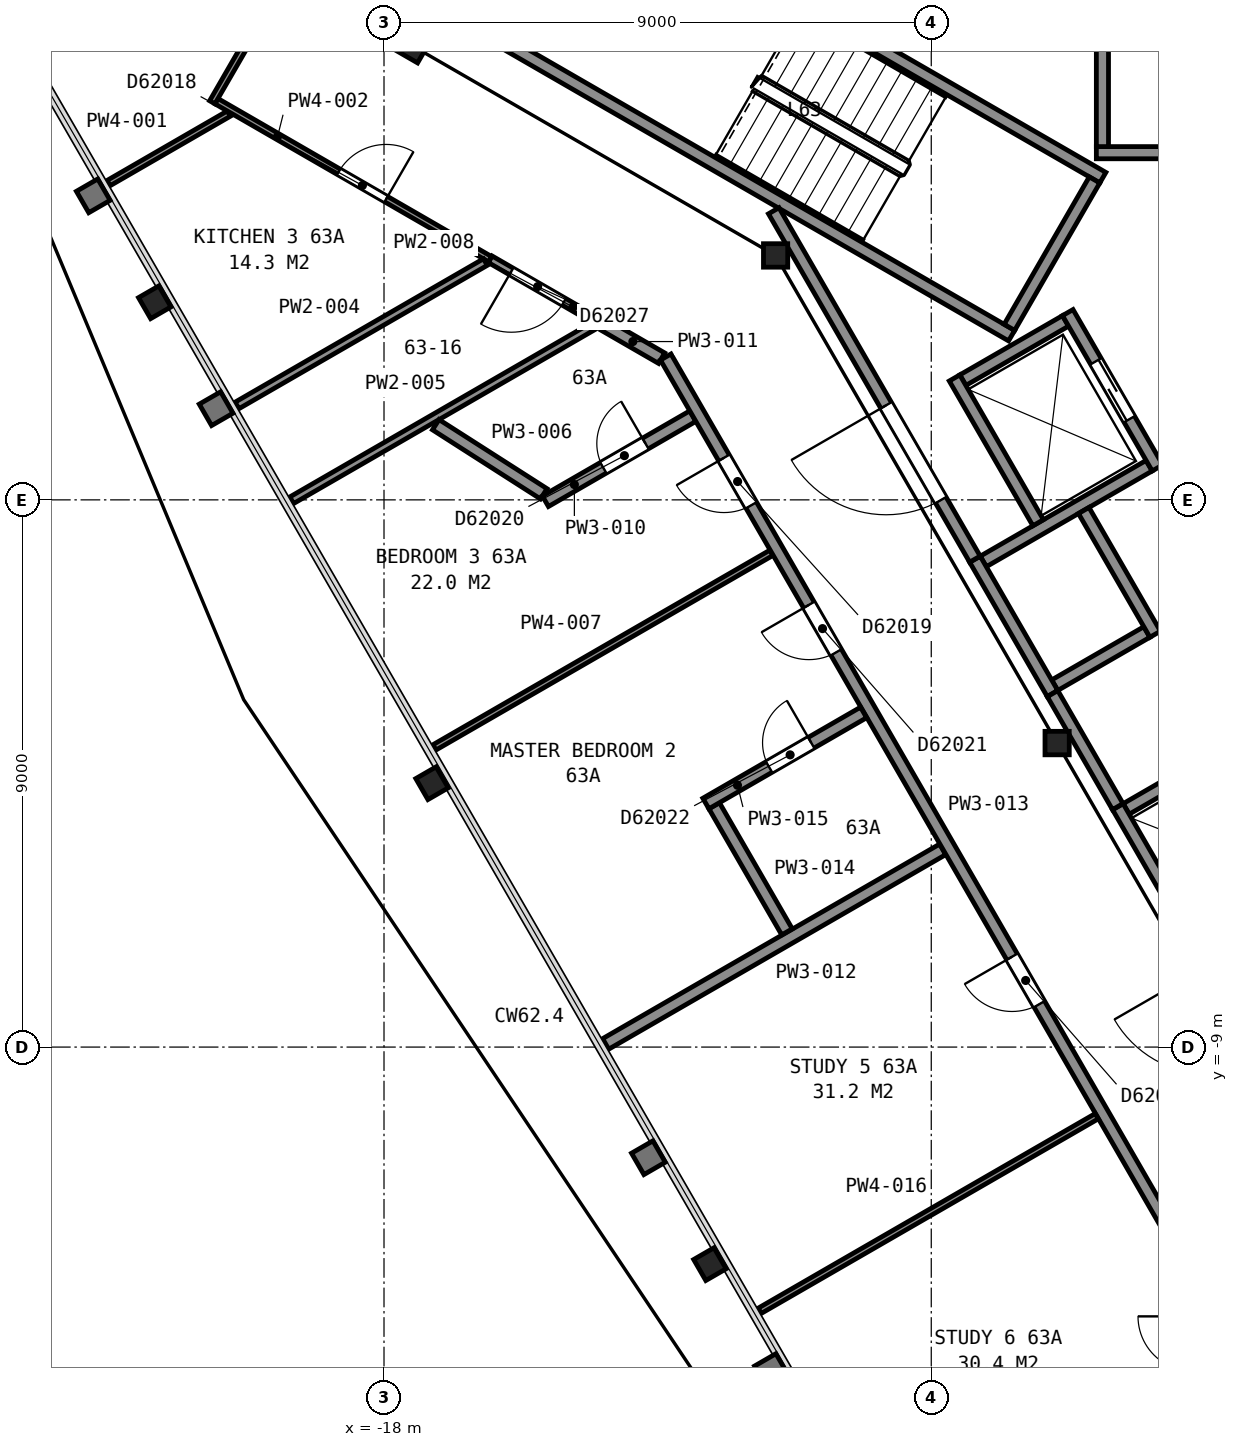
"""IFC4 building model, lengths in metres.
Left out: names, types, materials, properties, quantities, classifications, styles, units other than length and angle.
Written with IfcOpenShell. Run it as: python <this file> out.ifc"""

import sys

from ifc_helpers import new_model, si_unit, direction, frame, frame_2d, origin, origin_2d, place, context, subcontext, project, spatial, rectangle, i_section, extrude, element, fill, save


model = new_model("IFC4")
c1 = context("Model", 3, precision=1e-05, world=origin(), true_north=direction((0.0, 1.0)))
c2 = subcontext(c1, "Body", "Model", "MODEL_VIEW")
j1 = project(units=[si_unit("LENGTHUNIT", "METRE"), si_unit("PLANEANGLEUNIT", "RADIAN")], contexts=[c1])
p1 = place(None, origin())
s1 = spatial("IfcSite", under=j1, at=p1, CompositionType="ELEMENT")
p2 = place(p1, origin())
s2 = spatial("IfcBuilding", under=s1, at=p2, CompositionType="ELEMENT")
p3 = place(p2, frame((0.0, 0.0, 250.8)))
s3 = spatial("IfcBuildingStorey", under=s2, at=p3, CompositionType="ELEMENT", Elevation=250.8)
for number, where, z_axis, x_axis in (
    (1, (-21.77, 3.25, 0.0), (0.0, 0.0, 1.0), (-0.5, 0.866, 0.0)),
    (2, (-17.21, -4.66, 0.0), (0.0, 0.0, 1.0), (-0.5, 0.866, 0.0)),
    (3, (-12.64, -12.57, 0.0), (0.0, 0.0, 1.0), (-0.5, 0.866, 0.0)),
):
    element("IfcColumn", number, at=place(p3, frame(where, z_axis=z_axis, x_axis=x_axis)), inside=s3, PredefinedType="COLUMN", context=c2, shape_type="SweptSolid", body=[
        extrude(i_section(OverallWidth=0.399, OverallDepth=0.386, WebThickness=0.021, FlangeThickness=0.033, FilletRadius=0.015, at=origin_2d()), origin(), (0.0, 0.0, 1.0), 3.7),
    ])
p4 = place(p3, frame((-17.52, 7.46, 0.0), z_axis=(0.0, 0.0, 1.0), x_axis=(0.5, 0.866025403784, 0.0)))
e4 = element("IfcColumn", 4, at=p4, inside=s3, PredefinedType="COLUMN", context=c2, shape_type="SweptSolid", body=[
    extrude(i_section(OverallWidth=0.401, OverallDepth=0.399, WebThickness=0.025, FlangeThickness=0.04, FilletRadius=0.015, at=origin_2d()), origin(), (0.0, 0.0, 1.0), 3.7),
])
for number, where, z_axis, x_axis in (
    (5, (-11.56, 4.02, 0.0), (0.0, 0.0, 1.0), (1.0, 0.0, 0.0)),
    (6, (-6.93, -4.0, 0.0), (0.0, 0.0, 1.0), (1.0, 0.0, 0.0)),
):
    element("IfcColumn", number, at=place(p3, frame(where, z_axis=z_axis, x_axis=x_axis)), inside=s3, PredefinedType="COLUMN", context=c2, shape_type="SweptSolid", body=[
        extrude(i_section(OverallWidth=0.399, OverallDepth=0.386, WebThickness=0.021, FlangeThickness=0.033, FilletRadius=0.015, at=origin_2d()), origin(), (0.0, 0.0, 1.0), 3.7),
    ])
for number, where, z_axis, x_axis in (
    (7, (-7.678, 2.701, 0.0), (0.0, 0.0, 1.0), (-0.866, 0.5, 0.0)),
    (8, (-6.178, 5.299, 0.0), (0.0, 0.0, 1.0), (-0.866, 0.5, 0.0)),
):
    element("IfcWall", number, at=place(p3, frame(where, z_axis=z_axis, x_axis=x_axis)), inside=s3, PredefinedType="PARTITIONING", context=c2, shape_type="SweptSolid", body=[
        extrude(rectangle(XDim=9.6, YDim=0.2, at=frame_2d((4.8, 0.0))), origin(), (0.0, 0.0, 1.0), 3.45),
    ])
p5 = place(p3, frame((-6.315, 5.262, 0.0), z_axis=(0.0, 0.0, 1.0), x_axis=(-0.500049511043, -0.865996816683, 0.0)))
e9 = element("IfcWall", 9, at=p5, inside=s3, PredefinedType="PARTITIONING", context=c2, shape_type="SweptSolid", body=[
    extrude(rectangle(XDim=2.8, YDim=0.2, at=frame_2d((1.4, 0.0))), origin(), (0.0, 0.0, 1.0), 3.45),
])
p6 = place(p3, frame((-6.285, 5.71, 0.0), z_axis=(0.0, 0.0, 1.0), x_axis=(1.0, 0.0, 0.0)))
e10 = element("IfcWall", 10, at=p6, inside=s3, PredefinedType="PARTITIONING", context=c2, shape_type="SweptSolid", body=[
    extrude(rectangle(XDim=2.35, YDim=0.2, at=frame_2d((1.175, 0.0))), origin(), (0.0, 0.0, 1.0), 3.7),
])
for number, where, z_axis, x_axis in (
    (11, (-5.795, -5.083, 0.0), (0.0, 0.0, 1.0), (0.866, 0.5, 0.0)),
    (12, (-6.97, -3.048, 0.0), (0.0, 0.0, 1.0), (0.866, 0.5, 0.0)),
):
    element("IfcWall", number, at=place(p3, frame(where, z_axis=z_axis, x_axis=x_axis)), inside=s3, PredefinedType="PARTITIONING", context=c2, shape_type="SweptSolid", body=[
        extrude(rectangle(XDim=1.75, YDim=0.2, at=frame_2d((0.875, 0.0))), origin(), (0.0, 0.0, 1.0), 3.7),
    ])
p7 = place(p3, frame((-8.145, -1.013, 0.0), z_axis=(0.0, 0.0, 1.0), x_axis=(0.866016494683, 0.500015430699, 0.0)))
e13 = element("IfcWall", 13, at=p7, inside=s3, PredefinedType="PARTITIONING", context=c2, shape_type="SweptSolid", body=[
    extrude(rectangle(XDim=3.15, YDim=0.2, at=frame_2d((1.575, 0.0))), origin(), (0.0, 0.0, 1.0), 3.7),
])
p8 = place(p3, frame((-8.48, 1.969, 0.0), z_axis=(0.0, 0.0, 1.0), x_axis=(0.866000020948, 0.500043961785, 0.0)))
e14 = element("IfcWall", 14, at=p8, inside=s3, PredefinedType="PARTITIONING", context=c2, shape_type="SweptSolid", body=[
    extrude(rectangle(XDim=1.95, YDim=0.2, at=frame_2d((0.975, 0.0))), origin(), (0.0, 0.0, 1.0), 3.7),
])
p9 = place(p3, frame((-6.185, 5.81, 0.0), z_axis=(0.0, 0.0, 1.0), x_axis=(0.0, 1.0, 0.0)))
e15 = element("IfcWall", 15, at=p9, inside=s3, PredefinedType="PARTITIONING", context=c2, shape_type="SweptSolid", body=[
    extrude(rectangle(XDim=1.75, YDim=0.2, at=frame_2d((0.875, 0.0))), origin(), (0.0, 0.0, 1.0), 3.7),
])
p10 = place(p3, frame((-5.28, 0.525, 0.0), z_axis=(0.0, 0.0, 1.0), x_axis=(-0.500037662692, 0.866003658127, 0.0)))
e16 = element("IfcWall", 16, at=p10, inside=s3, PredefinedType="PARTITIONING", context=c2, shape_type="SweptSolid", body=[
    extrude(rectangle(XDim=2.95, YDim=0.2, at=frame_2d((1.475, 0.0))), origin(), (0.0, 0.0, 1.0), 3.7),
])
p11 = place(p10, frame((0.925, 0.0, 0.0)))
e17 = element("IfcOpeningElement", 17, at=p11, cuts=e16, PredefinedType="OPENING", context=c2, shape_type="SweptSolid", body=[
    extrude(rectangle(XDim=1.1, YDim=2.1, at=frame_2d((0.55, 1.05))), frame((0.0, 0.11, 0.0), z_axis=(0.0, -1.0, 0.0), x_axis=(1.0, 0.0, 0.0)), (0.0, 0.0, 1.0), 0.22),
])
p12 = place(p3, frame((-5.318, -2.21, 0.0), z_axis=(0.0, 0.0, 1.0), x_axis=(-0.499938297808, 0.866061024631, 0.0)))
e18 = element("IfcWall", 18, at=p12, inside=s3, PredefinedType="PARTITIONING", context=c2, shape_type="SweptSolid", body=[
    extrude(rectangle(XDim=2.35, YDim=0.2, at=frame_2d((1.175, 0.0))), origin(), (0.0, 0.0, 1.0), 3.7),
])
p13 = place(p3, frame((-7.242, -0.376, 0.0), z_axis=(0.0, 0.0, 1.0), x_axis=(-0.499996545922, 0.866027397988, 0.0)))
e19 = element("IfcWall", 19, at=p13, inside=s3, PredefinedType="PARTITIONING", context=c2, shape_type="SweptSolid", body=[
    extrude(rectangle(XDim=2.75, YDim=0.2, at=frame_2d((1.375, 0.0))), origin(), (0.0, 0.0, 1.0), 3.7),
])
for number, where, z_axis, x_axis in (
    (20, (-4.656, -7.255, 0.0), (0.0, 0.0, 1.0), (-0.5, 0.866, 0.0)),
    (21, (-7.006, -3.185, 0.0), (0.0, 0.0, 1.0), (-0.5, 0.866, 0.0)),
):
    element("IfcWall", number, at=place(p3, frame(where, z_axis=z_axis, x_axis=x_axis)), inside=s3, PredefinedType="PARTITIONING", context=c2, shape_type="SweptSolid", body=[
        extrude(rectangle(XDim=2.55, YDim=0.2, at=frame_2d((1.275, 0.0))), origin(), (0.0, 0.0, 1.0), 3.7),
    ])
p14 = place(p3, frame((-11.591, 4.755, 0.0), z_axis=(0.0, 0.0, 1.0), x_axis=(0.500043977787, -0.866000011708, 0.0)))
e22 = element("IfcWall", 22, at=p14, inside=s3, PredefinedType="PARTITIONING", context=c2, shape_type="SweptSolid", body=[
    extrude(rectangle(XDim=6.617, YDim=0.2, at=frame_2d((3.308, 0.0))), origin(), (0.0, 0.0, 1.0), 3.45),
])
p15 = place(p14, frame((3.695, 0.0, 0.0)))
e23 = element("IfcOpeningElement", 23, at=p15, cuts=e22, PredefinedType="OPENING", context=c2, shape_type="SweptSolid", body=[
    extrude(rectangle(XDim=1.8, YDim=2.1, at=frame_2d((0.9, 1.05))), frame((0.0, 0.11, 0.0), z_axis=(0.0, -1.0, 0.0), x_axis=(1.0, 0.0, 0.0)), (0.0, 0.0, 1.0), 0.22),
])
p16 = place(p3, frame((-7.005, -3.187, 0.0), z_axis=(0.0, 0.0, 1.0), x_axis=(0.499689606989, -0.866204535123, 0.0)))
e24 = element("IfcWall", 24, at=p16, inside=s3, PredefinedType="PARTITIONING", context=c2, shape_type="SweptSolid", body=[
    extrude(rectangle(XDim=2.145, YDim=0.2, at=frame_2d((1.072, 0.0))), origin(), (0.0, 0.0, 1.0), 3.45),
])
p17 = place(p3, frame((-22.53, 5.21, 0.0), z_axis=(0.0, 0.0, 1.0), x_axis=(0.865865073245, 0.500277597875, 0.0)))
e25 = element("IfcWall", 25, at=p17, inside=s3, PredefinedType="PARTITIONING", context=c2, shape_type="SweptSolid", body=[
    extrude(rectangle(XDim=2.284, YDim=0.1, at=frame_2d((1.142, 0.0))), origin(), (0.0, 0.0, 1.0), 2.713),
])
p18 = place(p3, frame((-16.253, 3.957, 0.0), z_axis=(0.0, 0.0, 1.0), x_axis=(-0.866006514596, 0.500032715607, 0.0)))
e26 = element("IfcWall", 26, at=p18, inside=s3, PredefinedType="PARTITIONING", context=c2, shape_type="SweptSolid", body=[
    extrude(rectangle(XDim=5.199, YDim=0.1, at=frame_2d((2.6, 0.0))), origin(), (0.0, 0.0, 1.0), 2.713),
])
p19 = place(p18, frame((1.978, 0.0, 0.0)))
e27 = element("IfcOpeningElement", 27, at=p19, cuts=e26, PredefinedType="OPENING", context=c2, shape_type="SweptSolid", body=[
    extrude(rectangle(XDim=0.9, YDim=2.1, at=frame_2d((0.45, 1.05))), frame((0.0, 0.06, 0.0), z_axis=(0.0, -1.0, 0.0), x_axis=(1.0, 0.0, 0.0)), (0.0, 0.0, 1.0), 0.12),
])
p20 = place(p3, frame((-20.824, 6.539, 0.0), z_axis=(0.0, 0.0, 1.0), x_axis=(0.500297300687, 0.865853689098, 0.0)))
e28 = element("IfcWall", 28, at=p20, inside=s3, PredefinedType="PARTITIONING", context=c2, shape_type="SweptSolid", body=[
    extrude(rectangle(XDim=9.496, YDim=0.1, at=frame_2d((4.748, 0.0))), origin(), (0.0, 0.0, 1.0), 2.713),
])
p21 = place(p20, frame((4.3, 0.0, 0.0)))
e29 = element("IfcOpeningElement", 29, at=p21, cuts=e28, PredefinedType="OPENING", context=c2, shape_type="SweptSolid", body=[
    extrude(rectangle(XDim=0.9, YDim=2.1, at=frame_2d((0.45, 1.05))), frame((0.0, 0.06, 0.0), z_axis=(0.0, -1.0, 0.0), x_axis=(1.0, 0.0, 0.0)), (0.0, 0.0, 1.0), 0.12),
])
p22 = place(p3, frame((-20.418, 1.553, 0.0), z_axis=(0.0, 0.0, 1.0), x_axis=(0.8660976733, 0.49987480463, 0.0)))
e30 = element("IfcWall", 30, at=p22, inside=s3, PredefinedType="PARTITIONING", context=c2, shape_type="SweptSolid", body=[
    extrude(rectangle(XDim=4.717, YDim=0.125, at=frame_2d((2.358, 0.0))), origin(), (0.0, 0.0, 1.0), 2.713),
])
p23 = place(p3, frame((-19.518, -0.006, 0.0), z_axis=(0.0, 0.0, 1.0), x_axis=(0.866072118736, 0.499919078599, 0.0)))
e31 = element("IfcWall", 31, at=p23, inside=s3, PredefinedType="PARTITIONING", context=c2, shape_type="SweptSolid", body=[
    extrude(rectangle(XDim=5.912, YDim=0.125, at=frame_2d((2.956, 0.0))), origin(), (0.0, 0.0, 1.0), 2.713),
])
p24 = place(p3, frame((-17.149, 1.236, 0.0), z_axis=(0.0, 0.0, 1.0), x_axis=(0.842376529327, -0.538889397593, 0.0)))
e32 = element("IfcWall", 32, at=p24, inside=s3, PredefinedType="PARTITIONING", context=c2, shape_type="SweptSolid", body=[
    extrude(rectangle(XDim=2.108, YDim=0.2, at=frame_2d((1.054, 0.0))), origin(), (0.0, 0.0, 1.0), 2.713),
])
p25 = place(p3, frame((-17.171, -4.071, 0.0), z_axis=(0.0, 0.0, 1.0), x_axis=(0.865973383125, 0.500090091603, 0.0)))
e33 = element("IfcWall", 33, at=p25, inside=s3, PredefinedType="PARTITIONING", context=c2, shape_type="SweptSolid", body=[
    extrude(rectangle(XDim=6.4, YDim=0.1, at=frame_2d((3.2, 0.0))), origin(), (0.0, 0.0, 1.0), 2.713),
])
p26 = place(p3, frame((-16.253, 3.957, 0.0), z_axis=(0.0, 0.0, 1.0), x_axis=(0.866173232673, -0.499743865396, 0.0)))
e34 = element("IfcWall", 34, at=p26, inside=s3, PredefinedType="PARTITIONING", context=c2, shape_type="SweptSolid", body=[
    extrude(rectangle(XDim=1.974, YDim=0.125, at=frame_2d((0.987, 0.0))), origin(), (0.0, 0.0, 1.0), 2.713),
])
p27 = place(p26, frame((0.4, 0.0, 0.0)))
e35 = element("IfcOpeningElement", 35, at=p27, cuts=e34, PredefinedType="OPENING", context=c2, shape_type="SweptSolid", body=[
    extrude(rectangle(XDim=1.0, YDim=2.1, at=frame_2d((0.5, 1.05))), frame((0.0, 0.073, 0.0), z_axis=(0.0, -1.0, 0.0), x_axis=(1.0, 0.0, 0.0)), (0.0, 0.0, 1.0), 0.145),
])
p28 = place(p3, frame((-15.346, -0.023, 0.0), z_axis=(0.0, 0.0, 1.0), x_axis=(0.865969158485, 0.500097407065, 0.0)))
e36 = element("IfcWall", 36, at=p28, inside=s3, PredefinedType="PARTITIONING", context=c2, shape_type="SweptSolid", body=[
    extrude(rectangle(XDim=2.799, YDim=0.2, at=frame_2d((1.4, 0.0))), origin(), (0.0, 0.0, 1.0), 2.713),
])
p29 = place(p28, frame((1.1, 0.0, 0.0)))
e37 = element("IfcOpeningElement", 37, at=p29, cuts=e36, PredefinedType="OPENING", context=c2, shape_type="SweptSolid", body=[
    extrude(rectangle(XDim=0.8, YDim=2.1, at=frame_2d((0.4, 1.05))), frame((0.0, 0.11, 0.0), z_axis=(0.0, -1.0, 0.0), x_axis=(1.0, 0.0, 0.0)), (0.0, 0.0, 1.0), 0.22),
])
p30 = place(p3, frame((-14.381, 2.877, 0.0), z_axis=(0.0, 0.0, 1.0), x_axis=(0.866215333661, -0.499670887416, 0.0)))
e38 = element("IfcWall", 38, at=p30, inside=s3, PredefinedType="PARTITIONING", context=c2, shape_type="SweptSolid", body=[
    extrude(rectangle(XDim=1.093, YDim=0.2, at=frame_2d((0.546, 0.0))), origin(), (0.0, 0.0, 1.0), 2.713),
])
p31 = place(p3, frame((-14.355, -8.948, 0.0), z_axis=(0.0, 0.0, 1.0), x_axis=(0.866039463868, 0.499975646431, 0.0)))
e39 = element("IfcWall", 39, at=p31, inside=s3, PredefinedType="PARTITIONING", context=c2, shape_type="SweptSolid", body=[
    extrude(rectangle(XDim=6.399, YDim=0.2, at=frame_2d((3.2, 0.0))), origin(), (0.0, 0.0, 1.0), 2.713),
])
p32 = place(p3, frame((-4.675, -12.706, 0.0), z_axis=(0.0, 0.0, 1.0), x_axis=(-0.499972470324, 0.866041297467, 0.0)))
e40 = element("IfcWall", 40, at=p32, inside=s3, PredefinedType="PARTITIONING", context=c2, shape_type="SweptSolid", body=[
    extrude(rectangle(XDim=17.385, YDim=0.2, at=frame_2d((8.692, 0.0))), origin(), (0.0, 0.0, 1.0), 2.713),
])
p33 = place(p32, frame((14.57, 0.0, 0.0)))
e41 = element("IfcOpeningElement", 41, at=p33, cuts=e40, PredefinedType="OPENING", context=c2, shape_type="SweptSolid", body=[
    extrude(rectangle(XDim=0.9, YDim=2.1, at=frame_2d((0.45, 1.05))), frame((0.0, 0.11, 0.0), z_axis=(0.0, -1.0, 0.0), x_axis=(1.0, 0.0, 0.0)), (0.0, 0.0, 1.0), 0.22),
])
p34 = place(p32, frame((11.777, 0.0, 0.0)))
e42 = element("IfcOpeningElement", 42, at=p34, cuts=e40, PredefinedType="OPENING", context=c2, shape_type="SweptSolid", body=[
    extrude(rectangle(XDim=0.9, YDim=2.1, at=frame_2d((0.45, 1.05))), frame((0.0, 0.11, 0.0), z_axis=(0.0, -1.0, 0.0), x_axis=(1.0, 0.0, 0.0)), (0.0, 0.0, 1.0), 0.22),
])
p35 = place(p32, frame((5.095, 0.0, 0.0)))
e43 = element("IfcOpeningElement", 43, at=p35, cuts=e40, PredefinedType="OPENING", context=c2, shape_type="SweptSolid", body=[
    extrude(rectangle(XDim=0.9, YDim=2.1, at=frame_2d((0.45, 1.05))), frame((0.0, 0.11, 0.0), z_axis=(0.0, -1.0, 0.0), x_axis=(1.0, 0.0, 0.0)), (0.0, 0.0, 1.0), 0.22),
])
p36 = place(p3, frame((-12.57, -5.031, 0.0), z_axis=(0.0, 0.0, 1.0), x_axis=(0.499943030081, -0.866058292884, 0.0)))
e44 = element("IfcWall", 44, at=p36, inside=s3, PredefinedType="PARTITIONING", context=c2, shape_type="SweptSolid", body=[
    extrude(rectangle(XDim=2.395, YDim=0.2, at=frame_2d((1.198, 0.0))), origin(), (0.0, 0.0, 1.0), 2.713),
])
p37 = place(p3, frame((-10.113, -3.497, 0.0), z_axis=(0.0, 0.0, 1.0), x_axis=(-0.866032178313, -0.499988265988, 0.0)))
e45 = element("IfcWall", 45, at=p37, inside=s3, PredefinedType="PARTITIONING", context=c2, shape_type="SweptSolid", body=[
    extrude(rectangle(XDim=2.995, YDim=0.2, at=frame_2d((1.497, 0.0))), origin(), (0.0, 0.0, 1.0), 2.713),
])
p38 = place(p37, frame((0.995, 0.0, 0.0)))
e46 = element("IfcOpeningElement", 46, at=p38, cuts=e45, PredefinedType="OPENING", context=c2, shape_type="SweptSolid", body=[
    extrude(rectangle(XDim=0.8, YDim=2.1, at=frame_2d((0.4, 1.05))), frame((0.0, 0.11, 0.0), z_axis=(0.0, -1.0, 0.0), x_axis=(1.0, 0.0, 0.0)), (0.0, 0.0, 1.0), 0.22),
])
p39 = place(p3, frame((-11.821, -13.337, 0.0), z_axis=(0.0, 0.0, 1.0), x_axis=(0.866013405822, 0.500020780506, 0.0)))
e47 = element("IfcWall", 47, at=p39, inside=s3, PredefinedType="PARTITIONING", context=c2, shape_type="SweptSolid", body=[
    extrude(rectangle(XDim=6.399, YDim=0.1, at=frame_2d((3.2, 0.0))), origin(), (0.0, 0.0, 1.0), 2.713),
])
p40 = place(p11, origin())
e48 = element("IfcDoor", 48, at=p40, inside=s3, OperationType="SLIDING_TO_LEFT", PredefinedType="DOOR", context=c2, shape_type="SweptSolid", body=[
    extrude(rectangle(XDim=1.1, YDim=2.1, at=frame_2d((0.55, 1.05))), frame((0.0, 0.025, 0.0), z_axis=(0.0, -1.0, 0.0), x_axis=(1.0, 0.0, 0.0)), (0.0, 0.0, 1.0), 0.05),
])
fill(e17, e48)
p41 = place(p15, origin())
e49 = element("IfcDoor", 49, at=p41, inside=s3, OperationType="DOUBLE_DOOR_SINGLE_SWING", PredefinedType="DOOR", context=c2, shape_type="SweptSolid", body=[
    extrude(rectangle(XDim=1.8, YDim=2.1, at=frame_2d((0.9, 1.05))), frame((0.0, 0.025, 0.0), z_axis=(0.0, -1.0, 0.0), x_axis=(1.0, 0.0, 0.0)), (0.0, 0.0, 1.0), 0.05),
])
fill(e23, e49)
p42 = place(p19, origin())
e50 = element("IfcDoor", 50, at=p42, inside=s3, OperationType="SINGLE_SWING_LEFT", PredefinedType="DOOR", context=c2, shape_type="SweptSolid", body=[
    extrude(rectangle(XDim=0.9, YDim=2.1, at=frame_2d((0.45, 1.05))), frame((0.0, 0.025, 0.0), z_axis=(0.0, -1.0, 0.0), x_axis=(1.0, 0.0, 0.0)), (0.0, 0.0, 1.0), 0.05),
])
fill(e27, e50)
p43 = place(p27, origin())
e51 = element("IfcDoor", 51, at=p43, inside=s3, OperationType="SINGLE_SWING_LEFT", PredefinedType="DOOR", context=c2, shape_type="SweptSolid", body=[
    extrude(rectangle(XDim=1.0, YDim=2.1, at=frame_2d((0.5, 1.05))), frame((0.0, 0.025, 0.0), z_axis=(0.0, -1.0, 0.0), x_axis=(1.0, 0.0, 0.0)), (0.0, 0.0, 1.0), 0.05),
])
fill(e35, e51)
p44 = place(p29, origin())
e52 = element("IfcDoor", 52, at=p44, inside=s3, OperationType="SINGLE_SWING_RIGHT", PredefinedType="DOOR", context=c2, shape_type="SweptSolid", body=[
    extrude(rectangle(XDim=0.8, YDim=2.1, at=frame_2d((0.4, 1.05))), frame((0.0, 0.025, 0.0), z_axis=(0.0, -1.0, 0.0), x_axis=(1.0, 0.0, 0.0)), (0.0, 0.0, 1.0), 0.05),
])
fill(e37, e52)
p45 = place(p33, origin())
e53 = element("IfcDoor", 53, at=p45, inside=s3, OperationType="SINGLE_SWING_RIGHT", PredefinedType="DOOR", context=c2, shape_type="SweptSolid", body=[
    extrude(rectangle(XDim=0.9, YDim=2.1, at=frame_2d((0.45, 1.05))), frame((0.0, 0.025, 0.0), z_axis=(0.0, -1.0, 0.0), x_axis=(1.0, 0.0, 0.0)), (0.0, 0.0, 1.0), 0.05),
])
fill(e41, e53)
p46 = place(p34, origin())
e54 = element("IfcDoor", 54, at=p46, inside=s3, OperationType="SINGLE_SWING_RIGHT", PredefinedType="DOOR", context=c2, shape_type="SweptSolid", body=[
    extrude(rectangle(XDim=0.9, YDim=2.1, at=frame_2d((0.45, 1.05))), frame((0.0, 0.025, 0.0), z_axis=(0.0, -1.0, 0.0), x_axis=(1.0, 0.0, 0.0)), (0.0, 0.0, 1.0), 0.05),
])
fill(e42, e54)
p47 = place(p35, origin())
e55 = element("IfcDoor", 55, at=p47, inside=s3, OperationType="SINGLE_SWING_RIGHT", PredefinedType="DOOR", context=c2, shape_type="SweptSolid", body=[
    extrude(rectangle(XDim=0.9, YDim=2.1, at=frame_2d((0.45, 1.05))), frame((0.0, 0.025, 0.0), z_axis=(0.0, -1.0, 0.0), x_axis=(1.0, 0.0, 0.0)), (0.0, 0.0, 1.0), 0.05),
])
fill(e43, e55)
p48 = place(p38, origin())
e56 = element("IfcDoor", 56, at=p48, inside=s3, OperationType="SINGLE_SWING_LEFT", PredefinedType="DOOR", context=c2, shape_type="SweptSolid", body=[
    extrude(rectangle(XDim=0.8, YDim=2.1, at=frame_2d((0.4, 1.05))), frame((0.0, 0.025, 0.0), z_axis=(0.0, -1.0, 0.0), x_axis=(1.0, 0.0, 0.0)), (0.0, 0.0, 1.0), 0.05),
])
fill(e46, e56)
save(model, sys.argv[1])
